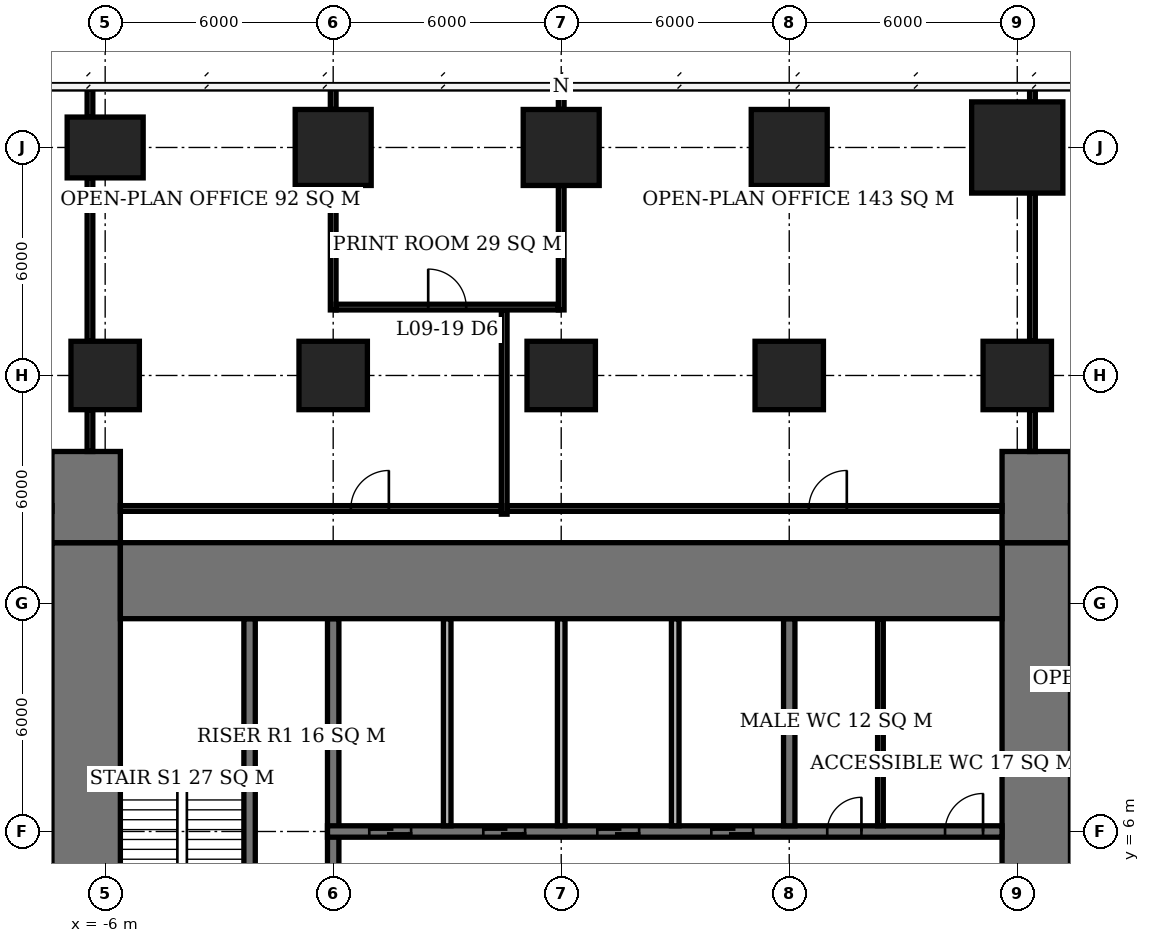
"""IFC4 building model, lengths in metres.
Left out: names, types, materials, properties, quantities, classifications, styles, units other than length and angle.
Written with IfcOpenShell. Run it as: python <this file> out.ifc"""

import sys

from ifc_helpers import new_model, si_unit, direction, frame, frame_2d, origin, origin_2d, place, context, subcontext, project, spatial, rectangle, extrude, element, fill, save


model = new_model("IFC4")
c1 = context("Model", 3, precision=1e-05, world=origin(), true_north=direction((0.0, 1.0)))
c2 = subcontext(c1, "Body", "Model", "MODEL_VIEW")
j1 = project(units=[si_unit("LENGTHUNIT", "METRE"), si_unit("PLANEANGLEUNIT", "RADIAN")], contexts=[c1])
p1 = place(None, origin())
s1 = spatial("IfcSite", under=j1, at=p1, CompositionType="ELEMENT")
p2 = place(p1, origin())
s2 = spatial("IfcBuilding", under=s1, at=p2, CompositionType="ELEMENT")
p3 = place(p2, frame((0.0, 0.0, 41.6)))
s3 = spatial("IfcBuildingStorey", under=s2, at=p3, CompositionType="ELEMENT", Elevation=41.6)
p4 = place(p3, frame((-6.0, 18.0, 0.0), z_axis=(0.0, 0.0, 1.0), x_axis=(1.0, 0.0, 0.0)))
e1 = element("IfcColumn", 1, at=p4, inside=s3, PredefinedType="COLUMN", context=c2, shape_type="SweptSolid", body=[
    extrude(rectangle(XDim=1.8, YDim=1.8, at=origin_2d()), origin(), (0.0, 0.0, 1.0), 3.9),
])
p5 = place(p3, frame((-6.0, 24.0, 0.0), z_axis=(0.0, 0.0, 1.0), x_axis=(1.0, 0.0, 0.0)))
e2 = element("IfcColumn", 2, at=p5, inside=s3, PredefinedType="COLUMN", context=c2, shape_type="SweptSolid", body=[
    extrude(rectangle(XDim=2.0, YDim=1.6, at=origin_2d()), origin(), (0.0, 0.0, 1.0), 3.9),
])
p6 = place(p3, frame((0.0, 18.0, 0.0), z_axis=(0.0, 0.0, 1.0), x_axis=(1.0, 0.0, 0.0)))
e3 = element("IfcColumn", 3, at=p6, inside=s3, PredefinedType="COLUMN", context=c2, shape_type="SweptSolid", body=[
    extrude(rectangle(XDim=1.8, YDim=1.8, at=origin_2d()), origin(), (0.0, 0.0, 1.0), 3.9),
])
p7 = place(p3, frame((0.0, 24.0, 0.0), z_axis=(0.0, 0.0, 1.0), x_axis=(1.0, 0.0, 0.0)))
e4 = element("IfcColumn", 4, at=p7, inside=s3, PredefinedType="COLUMN", context=c2, shape_type="SweptSolid", body=[
    extrude(rectangle(XDim=2.0, YDim=2.0, at=origin_2d()), origin(), (0.0, 0.0, 1.0), 3.9),
])
p8 = place(p3, frame((6.0, 18.0, 0.0), z_axis=(0.0, 0.0, 1.0), x_axis=(1.0, 0.0, 0.0)))
e5 = element("IfcColumn", 5, at=p8, inside=s3, PredefinedType="COLUMN", context=c2, shape_type="SweptSolid", body=[
    extrude(rectangle(XDim=1.8, YDim=1.8, at=origin_2d()), origin(), (0.0, 0.0, 1.0), 3.9),
])
p9 = place(p3, frame((6.0, 24.0, 0.0), z_axis=(0.0, 0.0, 1.0), x_axis=(1.0, 0.0, 0.0)))
e6 = element("IfcColumn", 6, at=p9, inside=s3, PredefinedType="COLUMN", context=c2, shape_type="SweptSolid", body=[
    extrude(rectangle(XDim=2.0, YDim=2.0, at=origin_2d()), origin(), (0.0, 0.0, 1.0), 3.9),
])
p10 = place(p3, frame((12.0, 18.0, 0.0), z_axis=(0.0, 0.0, 1.0), x_axis=(1.0, 0.0, 0.0)))
e7 = element("IfcColumn", 7, at=p10, inside=s3, PredefinedType="COLUMN", context=c2, shape_type="SweptSolid", body=[
    extrude(rectangle(XDim=1.8, YDim=1.8, at=origin_2d()), origin(), (0.0, 0.0, 1.0), 3.9),
])
p11 = place(p3, frame((12.0, 24.0, 0.0), z_axis=(0.0, 0.0, 1.0), x_axis=(1.0, 0.0, 0.0)))
e8 = element("IfcColumn", 8, at=p11, inside=s3, PredefinedType="COLUMN", context=c2, shape_type="SweptSolid", body=[
    extrude(rectangle(XDim=2.0, YDim=2.0, at=origin_2d()), origin(), (0.0, 0.0, 1.0), 3.9),
])
p12 = place(p3, frame((18.0, 18.0, 0.0), z_axis=(0.0, 0.0, 1.0), x_axis=(1.0, 0.0, 0.0)))
e9 = element("IfcColumn", 9, at=p12, inside=s3, PredefinedType="COLUMN", context=c2, shape_type="SweptSolid", body=[
    extrude(rectangle(XDim=1.8, YDim=1.8, at=origin_2d()), origin(), (0.0, 0.0, 1.0), 3.9),
])
p13 = place(p3, frame((18.0, 24.0, 0.0), z_axis=(0.0, 0.0, 1.0), x_axis=(1.0, 0.0, 0.0)))
e10 = element("IfcColumn", 10, at=p13, inside=s3, PredefinedType="COLUMN", context=c2, shape_type="SweptSolid", body=[
    extrude(rectangle(XDim=2.4, YDim=2.4, at=origin_2d()), origin(), (0.0, 0.0, 1.0), 3.9),
])
p14 = place(p3, frame((-5.6, 12.6, 0.0), z_axis=(0.0, 0.0, 1.0), x_axis=(1.0, 0.0, 0.0)))
e11 = element("IfcWall", 11, at=p14, inside=s3, PredefinedType="SHEAR", context=c2, shape_type="SweptSolid", body=[
    extrude(rectangle(XDim=23.2, YDim=2.0, at=frame_2d((11.6, 0.0))), origin(), (0.0, 0.0, 1.0), 3.9),
])
p15 = place(p3, frame((-6.5, -7.6, 0.0), z_axis=(0.0, 0.0, 1.0), x_axis=(0.0, 1.0, 0.0)))
e12 = element("IfcWall", 12, at=p15, inside=s3, PredefinedType="SHEAR", context=c2, shape_type="SweptSolid", body=[
    extrude(rectangle(XDim=21.2, YDim=1.8, at=frame_2d((10.6, 0.0))), origin(), (0.0, 0.0, 1.0), 3.9),
])
p16 = place(p15, frame((7.8, 0.0, 0.0)))
e13 = element("IfcOpeningElement", 13, at=p16, cuts=e12, PredefinedType="OPENING", context=c2, shape_type="SweptSolid", body=[
    extrude(rectangle(XDim=1.8, YDim=2.4, at=frame_2d((0.9, 1.2))), frame((0.0, 0.91, 0.0), z_axis=(0.0, -1.0, 0.0), x_axis=(1.0, 0.0, 0.0)), (0.0, 0.0, 1.0), 1.82),
])
p17 = place(p3, frame((18.5, -7.6, 0.0), z_axis=(0.0, 0.0, 1.0), x_axis=(0.0, 1.0, 0.0)))
e14 = element("IfcWall", 14, at=p17, inside=s3, PredefinedType="SHEAR", context=c2, shape_type="SweptSolid", body=[
    extrude(rectangle(XDim=21.2, YDim=1.8, at=frame_2d((10.6, 0.0))), origin(), (0.0, 0.0, 1.0), 3.9),
])
p18 = place(p17, frame((9.2, 0.0, 0.0)))
e15 = element("IfcOpeningElement", 15, at=p18, cuts=e14, PredefinedType="OPENING", context=c2, shape_type="SweptSolid", body=[
    extrude(rectangle(XDim=1.8, YDim=2.4, at=frame_2d((0.9, 1.2))), frame((0.0, 0.91, 0.0), z_axis=(0.0, -1.0, 0.0), x_axis=(1.0, 0.0, 0.0)), (0.0, 0.0, 1.0), 1.82),
])
for number, where, z_axis, x_axis in (
    (16, (-6.5, 13.6, 0.0), (0.0, 0.0, 1.0), (0.0, 1.0, 0.0)),
    (17, (18.5, 13.6, 0.0), (0.0, 0.0, 1.0), (0.0, 1.0, 0.0)),
):
    element("IfcWall", number, at=place(p3, frame(where, z_axis=z_axis, x_axis=x_axis)), inside=s3, PredefinedType="SHEAR", context=c2, shape_type="SweptSolid", body=[
        extrude(rectangle(XDim=2.4, YDim=1.8, at=frame_2d((1.2, 0.0))), origin(), (0.0, 0.0, 1.0), 3.9),
    ])
p19 = place(p3, frame((-0.15, 6.0, 0.0), z_axis=(0.0, 0.0, 1.0), x_axis=(1.0, 0.0, 0.0)))
e18 = element("IfcWall", 18, at=p19, inside=s3, PredefinedType="SHEAR", context=c2, shape_type="SweptSolid", body=[
    extrude(rectangle(XDim=17.75, YDim=0.3, at=frame_2d((8.875, 0.0))), origin(), (0.0, 0.0, 1.0), 3.9),
])
p20 = place(p19, frame((13.15, 0.0, 0.0)))
e19 = element("IfcOpeningElement", 19, at=p20, cuts=e18, PredefinedType="OPENING", context=c2, shape_type="SweptSolid", body=[
    extrude(rectangle(XDim=0.9, YDim=2.1, at=frame_2d((0.45, 1.05))), frame((0.0, 0.16, 0.0), z_axis=(0.0, -1.0, 0.0), x_axis=(1.0, 0.0, 0.0)), (0.0, 0.0, 1.0), 0.32),
])
p21 = place(p19, frame((16.25, 0.0, 0.0)))
e20 = element("IfcOpeningElement", 20, at=p21, cuts=e18, PredefinedType="OPENING", context=c2, shape_type="SweptSolid", body=[
    extrude(rectangle(XDim=1.0, YDim=2.1, at=frame_2d((0.5, 1.05))), frame((0.0, 0.16, 0.0), z_axis=(0.0, -1.0, 0.0), x_axis=(1.0, 0.0, 0.0)), (0.0, 0.0, 1.0), 0.32),
])
p22 = place(p19, frame((1.1, 0.0, 0.0)))
e21 = element("IfcOpeningElement", 21, at=p22, cuts=e18, PredefinedType="OPENING", context=c2, shape_type="SweptSolid", body=[
    extrude(rectangle(XDim=1.1, YDim=2.1, at=frame_2d((0.55, 1.05))), frame((0.0, 0.16, 0.0), z_axis=(0.0, -1.0, 0.0), x_axis=(1.0, 0.0, 0.0)), (0.0, 0.0, 1.0), 0.32),
])
p23 = place(p19, frame((4.1, 0.0, 0.0)))
e22 = element("IfcOpeningElement", 22, at=p23, cuts=e18, PredefinedType="OPENING", context=c2, shape_type="SweptSolid", body=[
    extrude(rectangle(XDim=1.1, YDim=2.1, at=frame_2d((0.55, 1.05))), frame((0.0, 0.16, 0.0), z_axis=(0.0, -1.0, 0.0), x_axis=(1.0, 0.0, 0.0)), (0.0, 0.0, 1.0), 0.32),
])
p24 = place(p19, frame((7.1, 0.0, 0.0)))
e23 = element("IfcOpeningElement", 23, at=p24, cuts=e18, PredefinedType="OPENING", context=c2, shape_type="SweptSolid", body=[
    extrude(rectangle(XDim=1.1, YDim=2.1, at=frame_2d((0.55, 1.05))), frame((0.0, 0.16, 0.0), z_axis=(0.0, -1.0, 0.0), x_axis=(1.0, 0.0, 0.0)), (0.0, 0.0, 1.0), 0.32),
])
p25 = place(p19, frame((10.1, 0.0, 0.0)))
e24 = element("IfcOpeningElement", 24, at=p25, cuts=e18, PredefinedType="OPENING", context=c2, shape_type="SweptSolid", body=[
    extrude(rectangle(XDim=1.1, YDim=2.1, at=frame_2d((0.55, 1.05))), frame((0.0, 0.16, 0.0), z_axis=(0.0, -1.0, 0.0), x_axis=(1.0, 0.0, 0.0)), (0.0, 0.0, 1.0), 0.32),
])
p26 = place(p3, frame((0.0, 3.15, 0.0), z_axis=(0.0, 0.0, 1.0), x_axis=(0.0, 1.0, 0.0)))
e25 = element("IfcWall", 25, at=p26, inside=s3, PredefinedType="SHEAR", context=c2, shape_type="SweptSolid", body=[
    extrude(rectangle(XDim=8.45, YDim=0.3, at=frame_2d((4.225, 0.0))), origin(), (0.0, 0.0, 1.0), 3.9),
])
p27 = place(p3, frame((12.0, 6.15, 0.0), z_axis=(0.0, 0.0, 1.0), x_axis=(0.0, 1.0, 0.0)))
e26 = element("IfcWall", 26, at=p27, inside=s3, PredefinedType="SHEAR", context=c2, shape_type="SweptSolid", body=[
    extrude(rectangle(XDim=5.45, YDim=0.3, at=frame_2d((2.725, 0.0))), origin(), (0.0, 0.0, 1.0), 3.9),
])
p28 = place(p3, frame((-2.2, 3.15, 0.0), z_axis=(0.0, 0.0, 1.0), x_axis=(0.0, 1.0, 0.0)))
e27 = element("IfcWall", 27, at=p28, inside=s3, PredefinedType="SHEAR", context=c2, shape_type="SweptSolid", body=[
    extrude(rectangle(XDim=8.45, YDim=0.3, at=frame_2d((4.225, 0.0))), origin(), (0.0, 0.0, 1.0), 3.9),
])
for number, where, z_axis, x_axis in (
    (28, (3.0, 6.15, 0.0), (0.0, 0.0, 1.0), (0.0, 1.0, 0.0)),
    (29, (6.0, 6.15, 0.0), (0.0, 0.0, 1.0), (0.0, 1.0, 0.0)),
    (30, (9.0, 6.15, 0.0), (0.0, 0.0, 1.0), (0.0, 1.0, 0.0)),
):
    element("IfcWall", number, at=place(p3, frame(where, z_axis=z_axis, x_axis=x_axis)), inside=s3, PredefinedType="SOLIDWALL", context=c2, shape_type="SweptSolid", body=[
        extrude(rectangle(XDim=5.45, YDim=0.2, at=frame_2d((2.725, 0.0))), origin(), (0.0, 0.0, 1.0), 3.9),
    ])
p29 = place(p3, frame((14.4, 6.15, 0.0), z_axis=(0.0, 0.0, 1.0), x_axis=(0.0, 1.0, 0.0)))
e31 = element("IfcWall", 31, at=p29, inside=s3, PredefinedType="PLUMBINGWALL", context=c2, shape_type="SweptSolid", body=[
    extrude(rectangle(XDim=5.45, YDim=0.15, at=frame_2d((2.725, 0.0))), origin(), (0.0, 0.0, 1.0), 3.65),
])
p30 = place(p3, frame((0.075, 19.8, 0.0), z_axis=(0.0, 0.0, 1.0), x_axis=(1.0, 0.0, 0.0)))
e32 = element("IfcWall", 32, at=p30, inside=s3, PredefinedType="PARTITIONING", context=c2, shape_type="SweptSolid", body=[
    extrude(rectangle(XDim=5.85, YDim=0.15, at=frame_2d((2.925, 0.0))), origin(), (0.0, 0.0, 1.0), 3.65),
])
p31 = place(p30, frame((2.425, 0.0, 0.0)))
e33 = element("IfcOpeningElement", 33, at=p31, cuts=e32, PredefinedType="OPENING", context=c2, shape_type="SweptSolid", body=[
    extrude(rectangle(XDim=1.0, YDim=2.1, at=frame_2d((0.5, 1.05))), frame((0.0, 0.085, 0.0), z_axis=(0.0, -1.0, 0.0), x_axis=(1.0, 0.0, 0.0)), (0.0, 0.0, 1.0), 0.17),
])
p32 = place(p3, frame((0.0, 19.725, 0.0), z_axis=(0.0, 0.0, 1.0), x_axis=(0.0, 1.0, 0.0)))
e34 = element("IfcWall", 34, at=p32, inside=s3, PredefinedType="PARTITIONING", context=c2, shape_type="SweptSolid", body=[
    extrude(rectangle(XDim=3.275, YDim=0.15, at=frame_2d((1.637, 0.0))), origin(), (0.0, 0.0, 1.0), 3.65),
])
p33 = place(p3, frame((0.0, 25.0, 0.0), z_axis=(0.0, 0.0, 1.0), x_axis=(0.0, 1.0, 0.0)))
e35 = element("IfcWall", 35, at=p33, inside=s3, PredefinedType="PARTITIONING", context=c2, shape_type="SweptSolid", body=[
    extrude(rectangle(XDim=0.6, YDim=0.15, at=frame_2d((0.3, 0.0))), origin(), (0.0, 0.0, 1.0), 3.65),
])
p34 = place(p3, frame((6.0, 19.725, 0.0), z_axis=(0.0, 0.0, 1.0), x_axis=(0.0, 1.0, 0.0)))
e36 = element("IfcWall", 36, at=p34, inside=s3, PredefinedType="PARTITIONING", context=c2, shape_type="SweptSolid", body=[
    extrude(rectangle(XDim=3.275, YDim=0.15, at=frame_2d((1.637, 0.0))), origin(), (0.0, 0.0, 1.0), 3.65),
])
p35 = place(p3, frame((6.0, 25.0, 0.0), z_axis=(0.0, 0.0, 1.0), x_axis=(0.0, 1.0, 0.0)))
e37 = element("IfcWall", 37, at=p35, inside=s3, PredefinedType="PARTITIONING", context=c2, shape_type="SweptSolid", body=[
    extrude(rectangle(XDim=0.55, YDim=0.15, at=frame_2d((0.275, 0.0))), origin(), (0.0, 0.0, 1.0), 3.65),
])
p36 = place(p3, frame((-6.4, 16.0, 0.0), z_axis=(0.0, 0.0, 1.0), x_axis=(0.0, 1.0, 0.0)))
e38 = element("IfcWall", 38, at=p36, inside=s3, PredefinedType="PARTITIONING", context=c2, shape_type="SweptSolid", body=[
    extrude(rectangle(XDim=1.1, YDim=0.15, at=frame_2d((0.55, 0.0))), origin(), (0.0, 0.0, 1.0), 3.65),
])
p37 = place(p3, frame((-6.4, 18.9, 0.0), z_axis=(0.0, 0.0, 1.0), x_axis=(0.0, 1.0, 0.0)))
e39 = element("IfcWall", 39, at=p37, inside=s3, PredefinedType="PARTITIONING", context=c2, shape_type="SweptSolid", body=[
    extrude(rectangle(XDim=4.3, YDim=0.15, at=frame_2d((2.15, 0.0))), origin(), (0.0, 0.0, 1.0), 3.65),
])
p38 = place(p3, frame((-6.4, 24.8, 0.0), z_axis=(0.0, 0.0, 1.0), x_axis=(0.0, 1.0, 0.0)))
e40 = element("IfcWall", 40, at=p38, inside=s3, PredefinedType="PARTITIONING", context=c2, shape_type="SweptSolid", body=[
    extrude(rectangle(XDim=0.75, YDim=0.15, at=frame_2d((0.375, 0.0))), origin(), (0.0, 0.0, 1.0), 3.65),
])
p39 = place(p3, frame((-5.6, 14.5, 0.0), z_axis=(0.0, 0.0, 1.0), x_axis=(1.0, 0.0, 0.0)))
e41 = element("IfcWall", 41, at=p39, inside=s3, PredefinedType="PARTITIONING", context=c2, shape_type="SweptSolid", body=[
    extrude(rectangle(XDim=10.025, YDim=0.15, at=frame_2d((5.013, 0.0))), origin(), (0.0, 0.0, 1.0), 3.65),
])
p40 = place(p39, frame((6.065, 0.0, 0.0)))
e42 = element("IfcOpeningElement", 42, at=p40, cuts=e41, PredefinedType="OPENING", context=c2, shape_type="SweptSolid", body=[
    extrude(rectangle(XDim=1.0, YDim=2.1, at=frame_2d((0.5, 1.05))), frame((0.0, 0.085, 0.0), z_axis=(0.0, -1.0, 0.0), x_axis=(1.0, 0.0, 0.0)), (0.0, 0.0, 1.0), 0.17),
])
p41 = place(p3, frame((4.5, 14.35, 0.0), z_axis=(0.0, 0.0, 1.0), x_axis=(0.0, 1.0, 0.0)))
e43 = element("IfcWall", 43, at=p41, inside=s3, PredefinedType="PARTITIONING", context=c2, shape_type="SweptSolid", body=[
    extrude(rectangle(XDim=5.375, YDim=0.15, at=frame_2d((2.688, 0.0))), origin(), (0.0, 0.0, 1.0), 3.65),
])
p42 = place(p3, frame((4.575, 14.5, 0.0), z_axis=(0.0, 0.0, 1.0), x_axis=(1.0, 0.0, 0.0)))
e44 = element("IfcWall", 44, at=p42, inside=s3, PredefinedType="PARTITIONING", context=c2, shape_type="SweptSolid", body=[
    extrude(rectangle(XDim=13.025, YDim=0.15, at=frame_2d((6.513, 0.0))), origin(), (0.0, 0.0, 1.0), 3.65),
])
p43 = place(p42, frame((7.94, 0.0, 0.0)))
e45 = element("IfcOpeningElement", 45, at=p43, cuts=e44, PredefinedType="OPENING", context=c2, shape_type="SweptSolid", body=[
    extrude(rectangle(XDim=1.0, YDim=2.1, at=frame_2d((0.5, 1.05))), frame((0.0, 0.085, 0.0), z_axis=(0.0, -1.0, 0.0), x_axis=(1.0, 0.0, 0.0)), (0.0, 0.0, 1.0), 0.17),
])
p44 = place(p3, frame((18.4, 16.0, 0.0), z_axis=(0.0, 0.0, 1.0), x_axis=(0.0, 1.0, 0.0)))
e46 = element("IfcWall", 46, at=p44, inside=s3, PredefinedType="PARTITIONING", context=c2, shape_type="SweptSolid", body=[
    extrude(rectangle(XDim=1.1, YDim=0.15, at=frame_2d((0.55, 0.0))), origin(), (0.0, 0.0, 1.0), 3.65),
])
p45 = place(p3, frame((18.4, 18.9, 0.0), z_axis=(0.0, 0.0, 1.0), x_axis=(0.0, 1.0, 0.0)))
e47 = element("IfcWall", 47, at=p45, inside=s3, PredefinedType="PARTITIONING", context=c2, shape_type="SweptSolid", body=[
    extrude(rectangle(XDim=3.9, YDim=0.15, at=frame_2d((1.95, 0.0))), origin(), (0.0, 0.0, 1.0), 3.65),
])
p46 = place(p3, frame((18.4, 25.2, 0.0), z_axis=(0.0, 0.0, 1.0), x_axis=(0.0, 1.0, 0.0)))
e48 = element("IfcWall", 48, at=p46, inside=s3, PredefinedType="PARTITIONING", context=c2, shape_type="SweptSolid", body=[
    extrude(rectangle(XDim=0.35, YDim=0.15, at=frame_2d((0.175, 0.0))), origin(), (0.0, 0.0, 1.0), 3.65),
])
p47 = place(p3, frame((19.4, 14.5, 0.0), z_axis=(0.0, 0.0, 1.0), x_axis=(1.0, 0.0, 0.0)))
e49 = element("IfcWall", 49, at=p47, inside=s3, PredefinedType="PARTITIONING", context=c2, shape_type="SweptSolid", body=[
    extrude(rectangle(XDim=1.175, YDim=0.15, at=frame_2d((0.587, 0.0))), origin(), (0.0, 0.0, 1.0), 3.65),
])
p48 = place(p20, origin())
e50 = element("IfcDoor", 50, at=p48, inside=s3, OperationType="SINGLE_SWING_RIGHT", PredefinedType="DOOR", context=c2, shape_type="SweptSolid", body=[
    extrude(rectangle(XDim=0.9, YDim=2.1, at=frame_2d((0.45, 1.05))), frame((0.0, 0.025, 0.0), z_axis=(0.0, -1.0, 0.0), x_axis=(1.0, 0.0, 0.0)), (0.0, 0.0, 1.0), 0.05),
])
fill(e19, e50)
p49 = place(p21, origin())
e51 = element("IfcDoor", 51, at=p49, inside=s3, OperationType="SINGLE_SWING_RIGHT", PredefinedType="DOOR", context=c2, shape_type="SweptSolid", body=[
    extrude(rectangle(XDim=1.0, YDim=2.1, at=frame_2d((0.5, 1.05))), frame((0.0, 0.025, 0.0), z_axis=(0.0, -1.0, 0.0), x_axis=(1.0, 0.0, 0.0)), (0.0, 0.0, 1.0), 0.05),
])
fill(e20, e51)
p50 = place(p22, origin())
e52 = element("IfcDoor", 52, at=p50, inside=s3, OperationType="DOUBLE_DOOR_SLIDING", PredefinedType="USERDEFINED", context=c2, shape_type="SweptSolid", body=[
    extrude(rectangle(XDim=1.1, YDim=2.1, at=frame_2d((0.55, 1.05))), frame((0.0, 0.025, 0.0), z_axis=(0.0, -1.0, 0.0), x_axis=(1.0, 0.0, 0.0)), (0.0, 0.0, 1.0), 0.05),
])
fill(e21, e52)
p51 = place(p23, origin())
e53 = element("IfcDoor", 53, at=p51, inside=s3, OperationType="DOUBLE_DOOR_SLIDING", PredefinedType="USERDEFINED", context=c2, shape_type="SweptSolid", body=[
    extrude(rectangle(XDim=1.1, YDim=2.1, at=frame_2d((0.55, 1.05))), frame((0.0, 0.025, 0.0), z_axis=(0.0, -1.0, 0.0), x_axis=(1.0, 0.0, 0.0)), (0.0, 0.0, 1.0), 0.05),
])
fill(e22, e53)
p52 = place(p24, origin())
e54 = element("IfcDoor", 54, at=p52, inside=s3, OperationType="DOUBLE_DOOR_SLIDING", PredefinedType="USERDEFINED", context=c2, shape_type="SweptSolid", body=[
    extrude(rectangle(XDim=1.1, YDim=2.1, at=frame_2d((0.55, 1.05))), frame((0.0, 0.025, 0.0), z_axis=(0.0, -1.0, 0.0), x_axis=(1.0, 0.0, 0.0)), (0.0, 0.0, 1.0), 0.05),
])
fill(e23, e54)
p53 = place(p25, origin())
e55 = element("IfcDoor", 55, at=p53, inside=s3, OperationType="DOUBLE_DOOR_SLIDING", PredefinedType="USERDEFINED", context=c2, shape_type="SweptSolid", body=[
    extrude(rectangle(XDim=1.1, YDim=2.1, at=frame_2d((0.55, 1.05))), frame((0.0, 0.025, 0.0), z_axis=(0.0, -1.0, 0.0), x_axis=(1.0, 0.0, 0.0)), (0.0, 0.0, 1.0), 0.05),
])
fill(e24, e55)
p54 = place(p31, origin())
e56 = element("IfcDoor", 56, at=p54, inside=s3, OperationType="SINGLE_SWING_LEFT", PredefinedType="DOOR", context=c2, shape_type="SweptSolid", body=[
    extrude(rectangle(XDim=1.0, YDim=2.1, at=frame_2d((0.5, 1.05))), frame((0.0, 0.025, 0.0), z_axis=(0.0, -1.0, 0.0), x_axis=(1.0, 0.0, 0.0)), (0.0, 0.0, 1.0), 0.05),
])
fill(e33, e56)
p55 = place(p40, origin())
e57 = element("IfcDoor", 57, at=p55, inside=s3, OperationType="SINGLE_SWING_RIGHT", PredefinedType="DOOR", context=c2, shape_type="SweptSolid", body=[
    extrude(rectangle(XDim=1.0, YDim=2.1, at=frame_2d((0.5, 1.05))), frame((0.0, 0.025, 0.0), z_axis=(0.0, -1.0, 0.0), x_axis=(1.0, 0.0, 0.0)), (0.0, 0.0, 1.0), 0.05),
])
fill(e42, e57)
p56 = place(p43, origin())
e58 = element("IfcDoor", 58, at=p56, inside=s3, OperationType="SINGLE_SWING_RIGHT", PredefinedType="DOOR", context=c2, shape_type="SweptSolid", body=[
    extrude(rectangle(XDim=1.0, YDim=2.1, at=frame_2d((0.5, 1.05))), frame((0.0, 0.025, 0.0), z_axis=(0.0, -1.0, 0.0), x_axis=(1.0, 0.0, 0.0)), (0.0, 0.0, 1.0), 0.05),
])
fill(e45, e58)
save(model, sys.argv[1])
